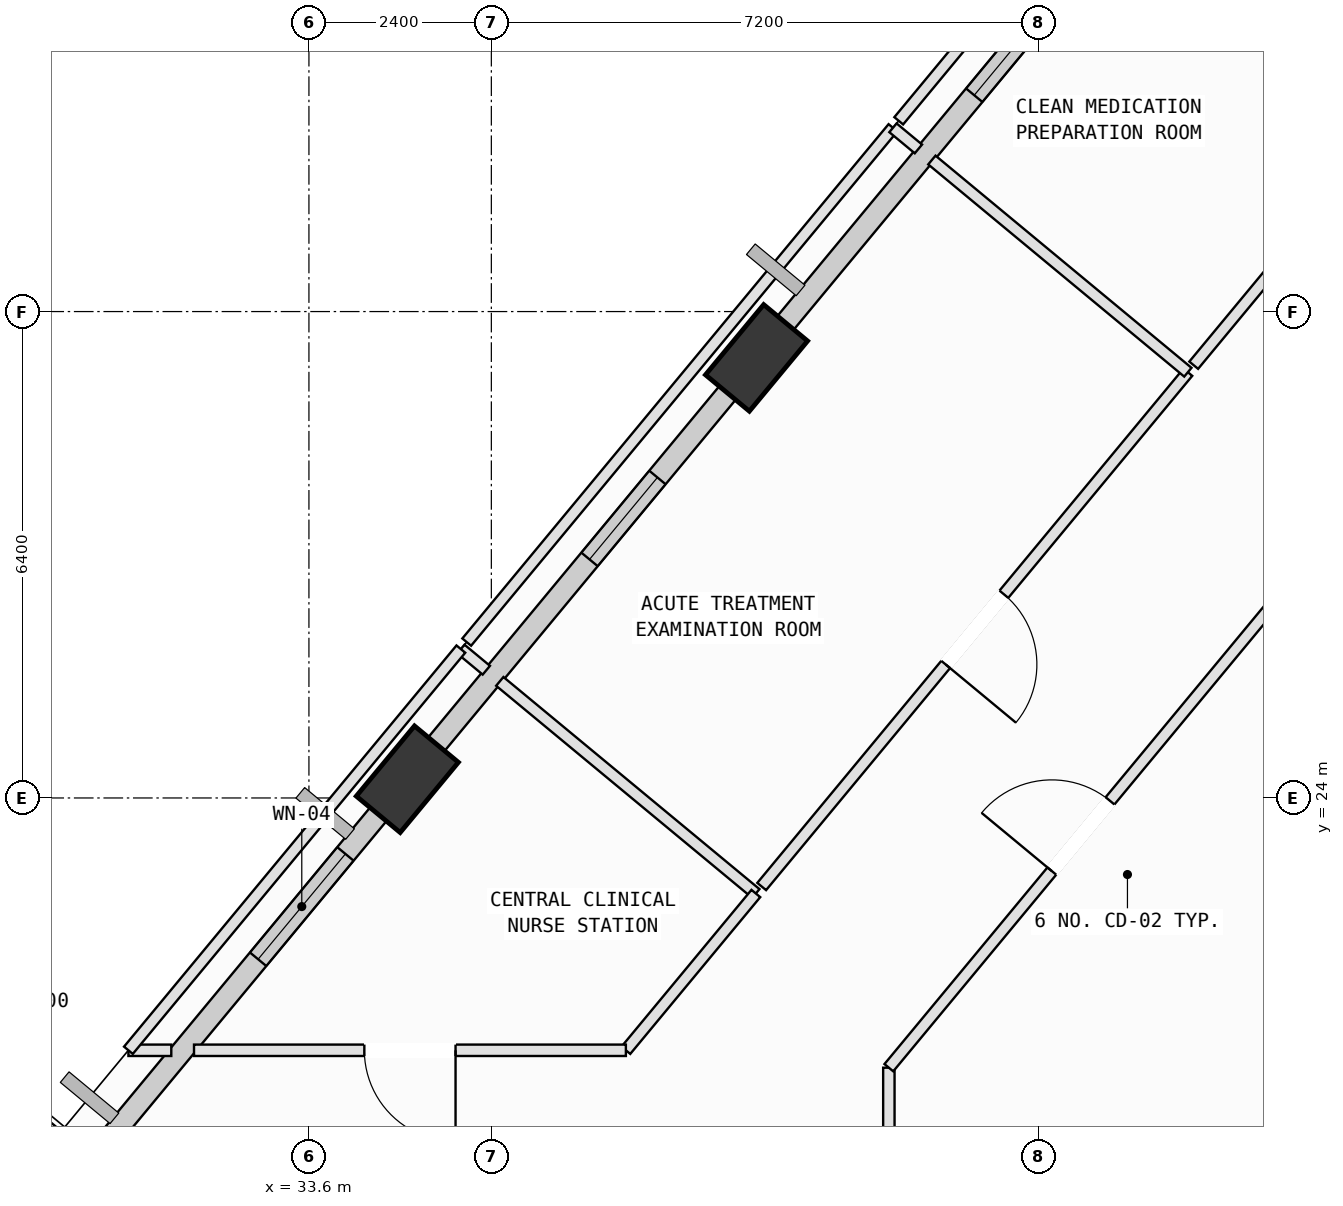
"""IFC4 building model, lengths in metres.
Left out: names, types, materials, properties, quantities, classifications, styles, units other than length and angle.
Written with IfcOpenShell. Run it as: python <this file> out.ifc"""

import sys

from ifc_helpers import new_model, si_unit, direction, frame, frame_2d, origin, origin_2d, place, context, subcontext, project, spatial, rectangle, extrude, element, fill, save


model = new_model("IFC4")
c1 = context("Model", 3, precision=1e-05, world=origin(), true_north=direction((0.0, 1.0)))
c2 = subcontext(c1, "Body", "Model", "MODEL_VIEW")
j1 = project(units=[si_unit("LENGTHUNIT", "METRE"), si_unit("PLANEANGLEUNIT", "RADIAN")], contexts=[c1])
p1 = place(None, origin())
s1 = spatial("IfcSite", under=j1, at=p1, CompositionType="ELEMENT")
p2 = place(p1, origin())
s2 = spatial("IfcBuilding", under=s1, at=p2, CompositionType="ELEMENT")
p3 = place(p2, frame((0.0, 0.0, 239.2)))
s3 = spatial("IfcBuildingStorey", under=s2, at=p3, CompositionType="ELEMENT", Elevation=239.2)
p4 = place(p3, frame((39.489, 29.79, 0.002), z_axis=(-0.020882454889, 0.024240744418, 0.999488023634), x_axis=(0.018828733053, -0.999519184868, 0.024634891753)))
e1 = element("IfcColumn", 1, at=p4, inside=s3, PredefinedType="COLUMN", context=c2, shape_type="SweptSolid", body=[
    extrude(rectangle(XDim=1.2, YDim=0.75, at=origin_2d()), origin(), (0.0, 0.0, 1.0), 3.998),
])
p5 = place(p3, frame((34.895, 24.247, 0.002), z_axis=(0.002199242026, 0.005375924953, 0.99998313124), x_axis=(-0.882113921896, -0.47101489174, 0.004472198159)))
e2 = element("IfcColumn", 2, at=p5, inside=s3, PredefinedType="COLUMN", context=c2, shape_type="SweptSolid", body=[
    extrude(rectangle(XDim=1.2, YDim=0.75, at=origin_2d()), origin(), (0.0, 0.0, 1.0), 3.996),
])
p6 = place(p3, frame((44.542, 35.463, 0.0), z_axis=(0.0, 0.0, 1.0), x_axis=(0.858430756312, -0.512929465539, 0.0)))
e3 = element("IfcWall", 3, at=p6, inside=s3, PredefinedType="SOLIDWALL", context=c2, shape_type="SweptSolid", body=[
    extrude(rectangle(XDim=9.036, YDim=0.28, at=frame_2d((4.518, 0.0))), origin(), (0.0, 0.0, 1.0), 3.265),
])
p7 = place(p3, frame((39.746, 30.101, 0.0), z_axis=(0.0, 0.0, 1.0), x_axis=(0.638113633716, 0.769942199431, 0.0)))
e4 = element("IfcWall", 4, at=p7, inside=s3, PredefinedType="SOLIDWALL", context=c2, shape_type="SweptSolid", body=[
    extrude(rectangle(XDim=6.78, YDim=0.28, at=frame_2d((3.39, 0.0))), origin(), (0.0, 0.0, 1.0), 3.265),
])
p8 = place(p7, frame((4.086, 0.0, 0.75)))
e5 = element("IfcOpeningElement", 5, at=p8, cuts=e4, PredefinedType="OPENING", context=c2, shape_type="SweptSolid", body=[
    extrude(rectangle(XDim=2.0, YDim=1.95, at=frame_2d((1.0, 0.975))), frame((0.0, 0.15, 0.0), z_axis=(0.0, -1.0, 0.0), x_axis=(1.0, 0.0, 0.0)), (0.0, 0.0, 1.0), 0.3),
])
p9 = place(p3, frame((35.156, 24.561, 0.0), z_axis=(0.0, 0.0, 1.0), x_axis=(0.63811013914, 0.769945095657, 0.0)))
e6 = element("IfcWall", 6, at=p9, inside=s3, PredefinedType="SOLIDWALL", context=c2, shape_type="SweptSolid", body=[
    extrude(rectangle(XDim=6.409, YDim=0.28, at=frame_2d((3.205, 0.0))), origin(), (0.0, 0.0, 1.0), 3.265),
])
p10 = place(p9, frame((3.348, 0.0, 0.75)))
e7 = element("IfcOpeningElement", 7, at=p10, cuts=e6, PredefinedType="OPENING", context=c2, shape_type="SweptSolid", body=[
    extrude(rectangle(XDim=1.4, YDim=1.85, at=frame_2d((0.7, 0.925))), frame((0.0, 0.15, 0.0), z_axis=(0.0, -1.0, 0.0), x_axis=(1.0, 0.0, 0.0)), (0.0, 0.0, 1.0), 0.3),
])
p11 = place(p3, frame((30.719, 19.208, 0.0), z_axis=(0.0, 0.0, 1.0), x_axis=(0.638099795901, 0.769953667743, 0.0)))
e8 = element("IfcWall", 8, at=p11, inside=s3, PredefinedType="SOLIDWALL", context=c2, shape_type="SweptSolid", body=[
    extrude(rectangle(XDim=6.158, YDim=0.28, at=frame_2d((3.079, 0.0))), origin(), (0.0, 0.0, 1.0), 3.265),
])
p12 = place(p11, frame((3.468, 0.0, 0.75)))
e9 = element("IfcOpeningElement", 9, at=p12, cuts=e8, PredefinedType="OPENING", context=c2, shape_type="SweptSolid", body=[
    extrude(rectangle(XDim=1.8, YDim=2.05, at=frame_2d((0.9, 1.025))), frame((0.0, 0.15, 0.0), z_axis=(0.0, -1.0, 0.0), x_axis=(1.0, 0.0, 0.0)), (0.0, 0.0, 1.0), 0.3),
])
p13 = place(p3, frame((41.23, 17.95, 0.0), z_axis=(0.0, 0.0, 1.0), x_axis=(0.0, 1.0, 0.0)))
e10 = element("IfcWall", 10, at=p13, inside=s3, PredefinedType="PARTITIONING", context=c2, shape_type="SweptSolid", body=[
    extrude(rectangle(XDim=2.501, YDim=0.15, at=frame_2d((1.25, 0.0))), origin(), (0.0, 0.0, 1.0), 3.78),
])
p14 = place(p3, frame((41.23, 20.451, 0.0), z_axis=(0.0, 0.0, 1.0), x_axis=(0.638108201762, 0.769946701301, 0.0)))
e11 = element("IfcWall", 11, at=p14, inside=s3, PredefinedType="PARTITIONING", context=c2, shape_type="SweptSolid", body=[
    extrude(rectangle(XDim=7.92, YDim=0.15, at=frame_2d((3.96, 0.0))), origin(), (0.0, 0.0, 1.0), 3.78),
])
p15 = place(p14, frame((3.36, 0.0, 0.0)))
e12 = element("IfcOpeningElement", 12, at=p15, cuts=e11, PredefinedType="OPENING", context=c2, shape_type="SweptSolid", body=[
    extrude(rectangle(XDim=1.2, YDim=2.15, at=frame_2d((0.6, 1.075))), frame((0.0, 0.085, 0.0), z_axis=(0.0, -1.0, 0.0), x_axis=(1.0, 0.0, 0.0)), (0.0, 0.0, 1.0), 0.17),
])
p16 = place(p3, frame((35.599, 25.959, 0.0), z_axis=(0.0, 0.0, 1.0), x_axis=(0.76941508452, -0.638749111712, 0.0)))
e13 = element("IfcWall", 13, at=p16, inside=s3, PredefinedType="PARTITIONING", context=c2, shape_type="SweptSolid", body=[
    extrude(rectangle(XDim=0.435, YDim=0.15, at=frame_2d((0.218, 0.0))), origin(), (0.0, 0.0, 1.0), 3.78),
])
p17 = place(p3, frame((36.111, 25.534, 0.0), z_axis=(0.0, 0.0, 1.0), x_axis=(0.770061509293, -0.637969648107, 0.0)))
e14 = element("IfcWall", 14, at=p17, inside=s3, PredefinedType="PARTITIONING", context=c2, shape_type="SweptSolid", body=[
    extrude(rectangle(XDim=4.375, YDim=0.15, at=frame_2d((2.188, 0.0))), origin(), (0.0, 0.0, 1.0), 3.78),
])
p18 = place(p3, frame((39.48, 22.743, 0.0), z_axis=(0.0, 0.0, 1.0), x_axis=(-0.638156773314, -0.769906444104, 0.0)))
e15 = element("IfcWall", 15, at=p18, inside=s3, PredefinedType="PARTITIONING", context=c2, shape_type="SweptSolid", body=[
    extrude(rectangle(XDim=2.679, YDim=0.15, at=frame_2d((1.34, 0.0))), origin(), (0.0, 0.0, 1.0), 3.78),
])
p19 = place(p3, frame((37.77, 20.68, 0.0), z_axis=(0.0, 0.0, 1.0), x_axis=(-1.0, 0.0, 0.0)))
e16 = element("IfcWall", 16, at=p19, inside=s3, PredefinedType="PARTITIONING", context=c2, shape_type="SweptSolid", body=[
    extrude(rectangle(XDim=5.682, YDim=0.15, at=frame_2d((2.841, 0.0))), origin(), (0.0, 0.0, 1.0), 3.415),
])
p20 = place(p19, frame((2.241, 0.0, 0.0)))
e17 = element("IfcOpeningElement", 17, at=p20, cuts=e16, PredefinedType="OPENING", context=c2, shape_type="SweptSolid", body=[
    extrude(rectangle(XDim=1.2, YDim=2.15, at=frame_2d((0.6, 1.075))), frame((0.0, 0.085, 0.0), z_axis=(0.0, -1.0, 0.0), x_axis=(1.0, 0.0, 0.0)), (0.0, 0.0, 1.0), 0.17),
])
p21 = place(p3, frame((31.789, 20.68, 0.0), z_axis=(0.0, 0.0, 1.0), x_axis=(-1.0, 0.0, 0.0)))
e18 = element("IfcWall", 18, at=p21, inside=s3, PredefinedType="PARTITIONING", context=c2, shape_type="SweptSolid", body=[
    extrude(rectangle(XDim=0.564, YDim=0.15, at=frame_2d((0.282, 0.0))), origin(), (0.0, 0.0, 1.0), 3.78),
])
p22 = place(p3, frame((31.225, 20.68, 0.0), z_axis=(0.0, 0.0, 1.0), x_axis=(0.638013641706, 0.77002505998, 0.0)))
e19 = element("IfcWall", 19, at=p22, inside=s3, PredefinedType="PARTITIONING", context=c2, shape_type="SweptSolid", body=[
    extrude(rectangle(XDim=6.856, YDim=0.15, at=frame_2d((3.428, 0.0))), origin(), (0.0, 0.0, 1.0), 3.78),
])
p23 = place(p3, frame((45.164, 29.602, 0.0), z_axis=(0.0, 0.0, 1.0), x_axis=(-0.638028689029, -0.770012592089, 0.0)))
e20 = element("IfcWall", 20, at=p23, inside=s3, PredefinedType="PARTITIONING", context=c2, shape_type="SweptSolid", body=[
    extrude(rectangle(XDim=8.788, YDim=0.15, at=frame_2d((4.394, 0.0))), origin(), (0.0, 0.0, 1.0), 3.78),
])
p24 = place(p23, frame((3.794, 0.0, 0.0)))
e21 = element("IfcOpeningElement", 21, at=p24, cuts=e20, PredefinedType="OPENING", context=c2, shape_type="SweptSolid", body=[
    extrude(rectangle(XDim=1.2, YDim=2.15, at=frame_2d((0.6, 1.075))), frame((0.0, 0.085, 0.0), z_axis=(0.0, -1.0, 0.0), x_axis=(1.0, 0.0, 0.0)), (0.0, 0.0, 1.0), 0.17),
])
p25 = place(p3, frame((35.676, 26.051, 0.0), z_axis=(0.0, 0.0, 1.0), x_axis=(0.638078099411, 0.769971648213, 0.0)))
e22 = element("IfcWall", 22, at=p25, inside=s3, PredefinedType="PARTITIONING", context=c2, shape_type="SweptSolid", body=[
    extrude(rectangle(XDim=8.789, YDim=0.15, at=frame_2d((4.395, 0.0))), origin(), (0.0, 0.0, 1.0), 3.265),
])
p26 = place(p3, frame((41.284, 32.818, 0.0), z_axis=(0.0, 0.0, 1.0), x_axis=(0.76941508452, -0.638749111712, 0.0)))
e23 = element("IfcWall", 23, at=p26, inside=s3, PredefinedType="PARTITIONING", context=c2, shape_type="SweptSolid", body=[
    extrude(rectangle(XDim=0.435, YDim=0.15, at=frame_2d((0.218, 0.0))), origin(), (0.0, 0.0, 1.0), 3.78),
])
p27 = place(p3, frame((41.796, 32.394, 0.0), z_axis=(0.0, 0.0, 1.0), x_axis=(0.769883678484, -0.638184237978, 0.0)))
e24 = element("IfcWall", 24, at=p27, inside=s3, PredefinedType="PARTITIONING", context=c2, shape_type="SweptSolid", body=[
    extrude(rectangle(XDim=4.375, YDim=0.15, at=frame_2d((2.188, 0.0))), origin(), (0.0, 0.0, 1.0), 3.78),
])
p28 = place(p3, frame((48.132, 33.183, 0.0), z_axis=(0.0, 0.0, 1.0), x_axis=(-0.638046160412, -0.769998115052, 0.0)))
e25 = element("IfcWall", 25, at=p28, inside=s3, PredefinedType="PARTITIONING", context=c2, shape_type="SweptSolid", body=[
    extrude(rectangle(XDim=4.531, YDim=0.15, at=frame_2d((2.266, 0.0))), origin(), (0.0, 0.0, 1.0), 3.78),
])
p29 = place(p28, frame((1.666, 0.0, 0.0)))
e26 = element("IfcOpeningElement", 26, at=p29, cuts=e25, PredefinedType="OPENING", context=c2, shape_type="SweptSolid", body=[
    extrude(rectangle(XDim=1.2, YDim=2.15, at=frame_2d((0.6, 1.075))), frame((0.0, 0.085, 0.0), z_axis=(0.0, -1.0, 0.0), x_axis=(1.0, 0.0, 0.0)), (0.0, 0.0, 1.0), 0.17),
])
p30 = place(p3, frame((41.36, 32.91, 0.0), z_axis=(0.0, 0.0, 1.0), x_axis=(0.638054595823, 0.76999112511, 0.0)))
e27 = element("IfcWall", 27, at=p30, inside=s3, PredefinedType="PARTITIONING", context=c2, shape_type="SweptSolid", body=[
    extrude(rectangle(XDim=4.504, YDim=0.15, at=frame_2d((2.252, 0.0))), origin(), (0.0, 0.0, 1.0), 3.265),
])
p31 = place(p8, origin())
e28 = element("IfcWindow", 28, at=p31, inside=s3, PartitioningType="SINGLE_PANEL", PredefinedType="WINDOW", context=c2, shape_type="SweptSolid", body=[
    extrude(rectangle(XDim=2.0, YDim=1.95, at=frame_2d((1.0, 0.975))), frame((0.0, 0.03, 0.0), z_axis=(0.0, -1.0, 0.0), x_axis=(1.0, 0.0, 0.0)), (0.0, 0.0, 1.0), 0.06),
])
fill(e5, e28)
p32 = place(p10, origin())
e29 = element("IfcWindow", 29, at=p32, inside=s3, PartitioningType="SINGLE_PANEL", PredefinedType="WINDOW", context=c2, shape_type="SweptSolid", body=[
    extrude(rectangle(XDim=1.4, YDim=1.85, at=frame_2d((0.7, 0.925))), frame((0.0, 0.03, 0.0), z_axis=(0.0, -1.0, 0.0), x_axis=(1.0, 0.0, 0.0)), (0.0, 0.0, 1.0), 0.06),
])
fill(e7, e29)
p33 = place(p12, origin())
e30 = element("IfcWindow", 30, at=p33, inside=s3, PartitioningType="SINGLE_PANEL", PredefinedType="WINDOW", context=c2, shape_type="SweptSolid", body=[
    extrude(rectangle(XDim=1.8, YDim=2.05, at=frame_2d((0.9, 1.025))), frame((0.0, 0.03, 0.0), z_axis=(0.0, -1.0, 0.0), x_axis=(1.0, 0.0, 0.0)), (0.0, 0.0, 1.0), 0.06),
])
fill(e9, e30)
p34 = place(p15, origin())
e31 = element("IfcDoor", 31, at=p34, inside=s3, OperationType="SINGLE_SWING_LEFT", PredefinedType="DOOR", context=c2, shape_type="SweptSolid", body=[
    extrude(rectangle(XDim=1.2, YDim=2.15, at=frame_2d((0.6, 1.075))), frame((0.0, 0.025, 0.0), z_axis=(0.0, -1.0, 0.0), x_axis=(1.0, 0.0, 0.0)), (0.0, 0.0, 1.0), 0.05),
])
fill(e12, e31)
p35 = place(p20, origin())
e32 = element("IfcDoor", 32, at=p35, inside=s3, OperationType="SINGLE_SWING_LEFT", PredefinedType="DOOR", context=c2, shape_type="SweptSolid", body=[
    extrude(rectangle(XDim=1.2, YDim=2.15, at=frame_2d((0.6, 1.075))), frame((0.0, 0.025, 0.0), z_axis=(0.0, -1.0, 0.0), x_axis=(1.0, 0.0, 0.0)), (0.0, 0.0, 1.0), 0.05),
])
fill(e17, e32)
p36 = place(p24, origin())
e33 = element("IfcDoor", 33, at=p36, inside=s3, OperationType="SINGLE_SWING_RIGHT", PredefinedType="DOOR", context=c2, shape_type="SweptSolid", body=[
    extrude(rectangle(XDim=1.2, YDim=2.15, at=frame_2d((0.6, 1.075))), frame((0.0, 0.025, 0.0), z_axis=(0.0, -1.0, 0.0), x_axis=(1.0, 0.0, 0.0)), (0.0, 0.0, 1.0), 0.05),
])
fill(e21, e33)
save(model, sys.argv[1])
